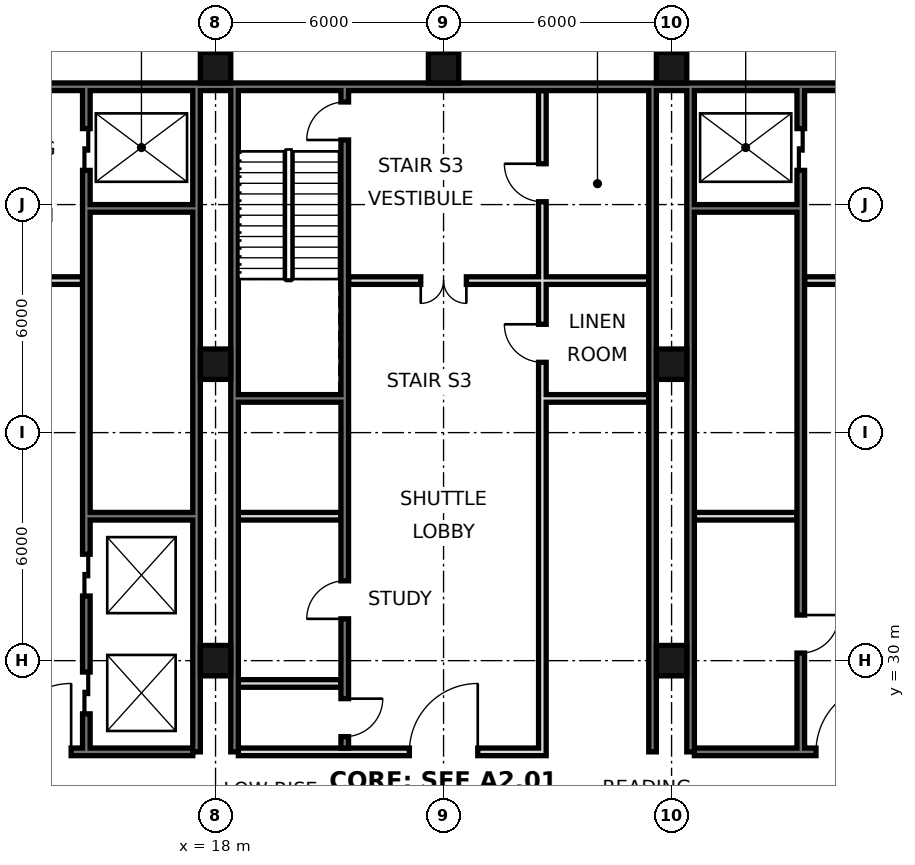
"""IFC4 building model, lengths in metres.
Left out: names, types, materials, properties, quantities, classifications, styles, units other than length and angle.
Written with IfcOpenShell. Run it as: python <this file> out.ifc"""

import sys

from ifc_helpers import new_model, si_unit, direction, frame, frame_2d, origin, origin_2d, place, context, subcontext, project, spatial, rectangle, hollow_rectangle, extrude, element, fill, save


model = new_model("IFC4")
c1 = context("Model", 3, precision=1e-05, world=origin(), true_north=direction((0.0, 1.0)))
c2 = subcontext(c1, "Body", "Model", "MODEL_VIEW")
j1 = project(units=[si_unit("LENGTHUNIT", "METRE"), si_unit("PLANEANGLEUNIT", "RADIAN")], contexts=[c1])
p1 = place(None, origin())
s1 = spatial("IfcSite", under=j1, at=p1, CompositionType="ELEMENT")
p2 = place(p1, origin())
s2 = spatial("IfcBuilding", under=s1, at=p2, CompositionType="ELEMENT")
p3 = place(p2, frame((0.0, 0.0, -13.5)))
s3 = spatial("IfcBuildingStorey", under=s2, at=p3, CompositionType="ELEMENT", Elevation=-13.5)
for number, where, z_axis, x_axis in (
    (1, (18.0, 30.0, 0.0), (0.0, 0.0, 1.0), (1.0, 0.0, 0.0)),
    (2, (18.0, 37.8, 0.0), (0.0, 0.0, 1.0), (1.0, 0.0, 0.0)),
    (3, (18.0, 45.6, 0.0), (0.0, 0.0, 1.0), (1.0, 0.0, 0.0)),
    (4, (24.0, 45.6, 0.0), (0.0, 0.0, 1.0), (1.0, 0.0, 0.0)),
    (5, (30.0, 30.0, 0.0), (0.0, 0.0, 1.0), (1.0, 0.0, 0.0)),
    (6, (30.0, 37.8, 0.0), (0.0, 0.0, 1.0), (1.0, 0.0, 0.0)),
    (7, (30.0, 45.6, 0.0), (0.0, 0.0, 1.0), (1.0, 0.0, 0.0)),
):
    element("IfcColumn", number, at=place(p3, frame(where, z_axis=z_axis, x_axis=x_axis)), inside=s3, PredefinedType="COLUMN", context=c2, shape_type="SweptSolid", body=[
        extrude(hollow_rectangle(XDim=0.8, YDim=0.8, WallThickness=0.07, at=origin_2d()), origin(), (0.0, 0.0, 1.0), 4.5),
    ])
p4 = place(p3, frame((6.6, 45.1, 0.0), z_axis=(0.0, 0.0, 1.0), x_axis=(1.0, 0.0, 0.0)))
e8 = element("IfcWall", 8, at=p4, inside=s3, PredefinedType="SOLIDWALL", context=c2, shape_type="SweptSolid", body=[
    extrude(rectangle(XDim=34.8, YDim=0.2, at=frame_2d((17.4, 0.0))), origin(), (0.0, 0.0, 1.0), 4.15),
])
for number, where, z_axis, x_axis in (
    (9, (17.5, 27.6, 0.0), (0.0, 0.0, 1.0), (0.0, 1.0, 0.0)),
    (10, (18.5, 27.6, 0.0), (0.0, 0.0, 1.0), (0.0, 1.0, 0.0)),
    (11, (29.5, 27.6, 0.0), (0.0, 0.0, 1.0), (0.0, 1.0, 0.0)),
    (12, (30.5, 27.6, 0.0), (0.0, 0.0, 1.0), (0.0, 1.0, 0.0)),
):
    element("IfcWall", number, at=place(p3, frame(where, z_axis=z_axis, x_axis=x_axis)), inside=s3, PredefinedType="SOLIDWALL", context=c2, shape_type="SweptSolid", body=[
        extrude(rectangle(XDim=17.5, YDim=0.2, at=frame_2d((8.75, 0.0))), origin(), (0.0, 0.0, 1.0), 4.15),
    ])
p5 = place(p3, frame((14.6, 27.7, 0.0), z_axis=(0.0, 0.0, 1.0), x_axis=(0.0, 1.0, 0.0)))
e13 = element("IfcWall", 13, at=p5, inside=s3, PredefinedType="SOLIDWALL", context=c2, shape_type="SweptSolid", body=[
    extrude(rectangle(XDim=17.3, YDim=0.2, at=frame_2d((8.65, 0.0))), origin(), (0.0, 0.0, 1.0), 4.15),
])
p6 = place(p5, frame((0.9, 0.0, 0.0)))
e14 = element("IfcOpeningElement", 14, at=p6, cuts=e13, PredefinedType="OPENING", context=c2, shape_type="SweptSolid", body=[
    extrude(rectangle(XDim=1.1, YDim=2.1, at=frame_2d((0.55, 1.05))), frame((0.0, 0.11, 0.0), z_axis=(0.0, -1.0, 0.0), x_axis=(1.0, 0.0, 0.0)), (0.0, 0.0, 1.0), 0.22),
])
p7 = place(p5, frame((4.0, 0.0, 0.0)))
e15 = element("IfcOpeningElement", 15, at=p7, cuts=e13, PredefinedType="OPENING", context=c2, shape_type="SweptSolid", body=[
    extrude(rectangle(XDim=1.1, YDim=2.1, at=frame_2d((0.55, 1.05))), frame((0.0, 0.11, 0.0), z_axis=(0.0, -1.0, 0.0), x_axis=(1.0, 0.0, 0.0)), (0.0, 0.0, 1.0), 0.22),
])
p8 = place(p5, frame((15.2, 0.0, 0.0)))
e16 = element("IfcOpeningElement", 16, at=p8, cuts=e13, PredefinedType="OPENING", context=c2, shape_type="SweptSolid", body=[
    extrude(rectangle(XDim=1.1, YDim=2.1, at=frame_2d((0.55, 1.05))), frame((0.0, 0.11, 0.0), z_axis=(0.0, -1.0, 0.0), x_axis=(1.0, 0.0, 0.0)), (0.0, 0.0, 1.0), 0.22),
])
p9 = place(p3, frame((21.4, 27.7, 0.0), z_axis=(0.0, 0.0, 1.0), x_axis=(0.0, 1.0, 0.0)))
e17 = element("IfcWall", 17, at=p9, inside=s3, PredefinedType="SOLIDWALL", context=c2, shape_type="SweptSolid", body=[
    extrude(rectangle(XDim=17.3, YDim=0.2, at=frame_2d((8.65, 0.0))), origin(), (0.0, 0.0, 1.0), 4.15),
])
p10 = place(p9, frame((0.3, 0.0, 0.0)))
e18 = element("IfcOpeningElement", 18, at=p10, cuts=e17, PredefinedType="OPENING", context=c2, shape_type="SweptSolid", body=[
    extrude(rectangle(XDim=1.0, YDim=2.1, at=frame_2d((0.5, 1.05))), frame((0.0, 0.11, 0.0), z_axis=(0.0, -1.0, 0.0), x_axis=(1.0, 0.0, 0.0)), (0.0, 0.0, 1.0), 0.22),
])
p11 = place(p9, frame((3.4, 0.0, 0.0)))
e19 = element("IfcOpeningElement", 19, at=p11, cuts=e17, PredefinedType="OPENING", context=c2, shape_type="SweptSolid", body=[
    extrude(rectangle(XDim=1.0, YDim=2.1, at=frame_2d((0.5, 1.05))), frame((0.0, 0.11, 0.0), z_axis=(0.0, -1.0, 0.0), x_axis=(1.0, 0.0, 0.0)), (0.0, 0.0, 1.0), 0.22),
])
p12 = place(p9, frame((16.0, 0.0, 0.0)))
e20 = element("IfcOpeningElement", 20, at=p12, cuts=e17, PredefinedType="OPENING", context=c2, shape_type="SweptSolid", body=[
    extrude(rectangle(XDim=1.0, YDim=2.1, at=frame_2d((0.5, 1.05))), frame((0.0, 0.11, 0.0), z_axis=(0.0, -1.0, 0.0), x_axis=(1.0, 0.0, 0.0)), (0.0, 0.0, 1.0), 0.22),
])
p13 = place(p3, frame((26.6, 27.5, 0.0), z_axis=(0.0, 0.0, 1.0), x_axis=(0.0, 1.0, 0.0)))
e21 = element("IfcWall", 21, at=p13, inside=s3, PredefinedType="PARTITIONING", context=c2, shape_type="SweptSolid", body=[
    extrude(rectangle(XDim=17.5, YDim=0.2, at=frame_2d((8.75, 0.0))), origin(), (0.0, 0.0, 1.0), 4.15),
])
p14 = place(p13, frame((10.35, 0.0, 0.0)))
e22 = element("IfcOpeningElement", 22, at=p14, cuts=e21, PredefinedType="OPENING", context=c2, shape_type="SweptSolid", body=[
    extrude(rectangle(XDim=1.0, YDim=2.1, at=frame_2d((0.5, 1.05))), frame((0.0, 0.11, 0.0), z_axis=(0.0, -1.0, 0.0), x_axis=(1.0, 0.0, 0.0)), (0.0, 0.0, 1.0), 0.22),
])
p15 = place(p13, frame((14.575, 0.0, 0.0)))
e23 = element("IfcOpeningElement", 23, at=p15, cuts=e21, PredefinedType="OPENING", context=c2, shape_type="SweptSolid", body=[
    extrude(rectangle(XDim=1.0, YDim=2.1, at=frame_2d((0.5, 1.05))), frame((0.0, 0.11, 0.0), z_axis=(0.0, -1.0, 0.0), x_axis=(1.0, 0.0, 0.0)), (0.0, 0.0, 1.0), 0.22),
])
p16 = place(p3, frame((33.4, 27.7, 0.0), z_axis=(0.0, 0.0, 1.0), x_axis=(0.0, 1.0, 0.0)))
e24 = element("IfcWall", 24, at=p16, inside=s3, PredefinedType="SOLIDWALL", context=c2, shape_type="SweptSolid", body=[
    extrude(rectangle(XDim=17.3, YDim=0.2, at=frame_2d((8.65, 0.0))), origin(), (0.0, 0.0, 1.0), 3.05),
])
p17 = place(p16, frame((15.2, 0.0, 0.0)))
e25 = element("IfcOpeningElement", 25, at=p17, cuts=e24, PredefinedType="OPENING", context=c2, shape_type="SweptSolid", body=[
    extrude(rectangle(XDim=1.1, YDim=2.1, at=frame_2d((0.55, 1.05))), frame((0.0, 0.11, 0.0), z_axis=(0.0, -1.0, 0.0), x_axis=(1.0, 0.0, 0.0)), (0.0, 0.0, 1.0), 0.22),
])
p18 = place(p16, frame((2.5, 0.0, 0.0)))
e26 = element("IfcOpeningElement", 26, at=p18, cuts=e24, PredefinedType="OPENING", context=c2, shape_type="SweptSolid", body=[
    extrude(rectangle(XDim=1.0, YDim=2.1, at=frame_2d((0.5, 1.05))), frame((0.0, 0.11, 0.0), z_axis=(0.0, -1.0, 0.0), x_axis=(1.0, 0.0, 0.0)), (0.0, 0.0, 1.0), 0.22),
])
p19 = place(p3, frame((18.6, 27.6, 0.0), z_axis=(0.0, 0.0, 1.0), x_axis=(1.0, 0.0, 0.0)))
e27 = element("IfcWall", 27, at=p19, inside=s3, PredefinedType="PARTITIONING", context=c2, shape_type="SweptSolid", body=[
    extrude(rectangle(XDim=7.9, YDim=0.2, at=frame_2d((3.95, 0.0))), origin(), (0.0, 0.0, 1.0), 4.15),
])
p20 = place(p19, frame((4.5, 0.0, 0.0)))
e28 = element("IfcOpeningElement", 28, at=p20, cuts=e27, PredefinedType="OPENING", context=c2, shape_type="SweptSolid", body=[
    extrude(rectangle(XDim=1.8, YDim=2.1, at=frame_2d((0.9, 1.05))), frame((0.0, 0.11, 0.0), z_axis=(0.0, -1.0, 0.0), x_axis=(1.0, 0.0, 0.0)), (0.0, 0.0, 1.0), 0.22),
])
p21 = place(p3, frame((30.6, 27.6, 0.0), z_axis=(0.0, 0.0, 1.0), x_axis=(1.0, 0.0, 0.0)))
e29 = element("IfcWall", 29, at=p21, inside=s3, PredefinedType="SOLIDWALL", context=c2, shape_type="SweptSolid", body=[
    extrude(rectangle(XDim=10.8, YDim=0.2, at=frame_2d((5.4, 0.0))), origin(), (0.0, 0.0, 1.0), 4.15),
])
p22 = place(p21, frame((3.2, 0.0, 0.0)))
e30 = element("IfcOpeningElement", 30, at=p22, cuts=e29, PredefinedType="OPENING", context=c2, shape_type="SweptSolid", body=[
    extrude(rectangle(XDim=1.8, YDim=2.1, at=frame_2d((0.9, 1.05))), frame((0.0, 0.11, 0.0), z_axis=(0.0, -1.0, 0.0), x_axis=(1.0, 0.0, 0.0)), (0.0, 0.0, 1.0), 0.22),
])
p23 = place(p3, frame((6.6, 27.6, 0.0), z_axis=(0.0, 0.0, 1.0), x_axis=(1.0, 0.0, 0.0)))
e31 = element("IfcWall", 31, at=p23, inside=s3, PredefinedType="SOLIDWALL", context=c2, shape_type="SweptSolid", body=[
    extrude(rectangle(XDim=10.8, YDim=0.2, at=frame_2d((5.4, 0.0))), origin(), (0.0, 0.0, 1.0), 4.15),
])
p24 = place(p23, frame((5.8, 0.0, 0.0)))
e32 = element("IfcOpeningElement", 32, at=p24, cuts=e31, PredefinedType="OPENING", context=c2, shape_type="SweptSolid", body=[
    extrude(rectangle(XDim=1.8, YDim=2.1, at=frame_2d((0.9, 1.05))), frame((0.0, 0.11, 0.0), z_axis=(0.0, -1.0, 0.0), x_axis=(1.0, 0.0, 0.0)), (0.0, 0.0, 1.0), 0.22),
])
p25 = place(p3, frame((18.6, 29.4, 0.0), z_axis=(0.0, 0.0, 1.0), x_axis=(1.0, 0.0, 0.0)))
e33 = element("IfcWall", 33, at=p25, inside=s3, PredefinedType="PARTITIONING", context=c2, shape_type="SweptSolid", body=[
    extrude(rectangle(XDim=2.7, YDim=0.2, at=frame_2d((1.35, 0.0))), origin(), (0.0, 0.0, 1.0), 4.15),
])
p26 = place(p3, frame((14.7, 33.8, 0.0), z_axis=(0.0, 0.0, 1.0), x_axis=(1.0, 0.0, 0.0)))
e34 = element("IfcWall", 34, at=p26, inside=s3, PredefinedType="SOLIDWALL", context=c2, shape_type="SweptSolid", body=[
    extrude(rectangle(XDim=2.7, YDim=0.2, at=frame_2d((1.35, 0.0))), origin(), (0.0, 0.0, 1.0), 4.15),
])
for number, where, z_axis, x_axis in (
    (35, (18.6, 33.8, 0.0), (0.0, 0.0, 1.0), (1.0, 0.0, 0.0)),
    (36, (30.6, 33.8, 0.0), (0.0, 0.0, 1.0), (1.0, 0.0, 0.0)),
):
    element("IfcWall", number, at=place(p3, frame(where, z_axis=z_axis, x_axis=x_axis)), inside=s3, PredefinedType="PARTITIONING", context=c2, shape_type="SweptSolid", body=[
        extrude(rectangle(XDim=2.7, YDim=0.2, at=frame_2d((1.35, 0.0))), origin(), (0.0, 0.0, 1.0), 4.15),
    ])
p27 = place(p3, frame((18.6, 36.9, 0.0), z_axis=(0.0, 0.0, 1.0), x_axis=(1.0, 0.0, 0.0)))
e37 = element("IfcWall", 37, at=p27, inside=s3, PredefinedType="SOLIDWALL", context=c2, shape_type="SweptSolid", body=[
    extrude(rectangle(XDim=2.7, YDim=0.2, at=frame_2d((1.35, 0.0))), origin(), (0.0, 0.0, 1.0), 4.15),
])
p28 = place(p3, frame((26.7, 36.9, 0.0), z_axis=(0.0, 0.0, 1.0), x_axis=(1.0, 0.0, 0.0)))
e38 = element("IfcWall", 38, at=p28, inside=s3, PredefinedType="PARTITIONING", context=c2, shape_type="SweptSolid", body=[
    extrude(rectangle(XDim=2.7, YDim=0.2, at=frame_2d((1.35, 0.0))), origin(), (0.0, 0.0, 1.0), 4.15),
])
p29 = place(p3, frame((21.5, 40.0, 0.0), z_axis=(0.0, 0.0, 1.0), x_axis=(1.0, 0.0, 0.0)))
e39 = element("IfcWall", 39, at=p29, inside=s3, PredefinedType="PARTITIONING", context=c2, shape_type="SweptSolid", body=[
    extrude(rectangle(XDim=7.9, YDim=0.2, at=frame_2d((3.95, 0.0))), origin(), (0.0, 0.0, 1.0), 4.15),
])
p30 = place(p29, frame((1.9, 0.0, 0.0)))
e40 = element("IfcOpeningElement", 40, at=p30, cuts=e39, PredefinedType="OPENING", context=c2, shape_type="SweptSolid", body=[
    extrude(rectangle(XDim=1.2, YDim=2.1, at=frame_2d((0.6, 1.05))), frame((0.0, 0.11, 0.0), z_axis=(0.0, -1.0, 0.0), x_axis=(1.0, 0.0, 0.0)), (0.0, 0.0, 1.0), 0.22),
])
p31 = place(p3, frame((33.5, 40.0, 0.0), z_axis=(0.0, 0.0, 1.0), x_axis=(1.0, 0.0, 0.0)))
e41 = element("IfcWall", 41, at=p31, inside=s3, PredefinedType="PARTITIONING", context=c2, shape_type="SweptSolid", body=[
    extrude(rectangle(XDim=5.0, YDim=0.2, at=frame_2d((2.5, 0.0))), origin(), (0.0, 0.0, 1.0), 4.15),
])
p32 = place(p31, frame((1.9, 0.0, 0.0)))
e42 = element("IfcOpeningElement", 42, at=p32, cuts=e41, PredefinedType="OPENING", context=c2, shape_type="SweptSolid", body=[
    extrude(rectangle(XDim=1.2, YDim=2.1, at=frame_2d((0.6, 1.05))), frame((0.0, 0.11, 0.0), z_axis=(0.0, -1.0, 0.0), x_axis=(1.0, 0.0, 0.0)), (0.0, 0.0, 1.0), 0.22),
])
p33 = place(p3, frame((9.5, 40.0, 0.0), z_axis=(0.0, 0.0, 1.0), x_axis=(1.0, 0.0, 0.0)))
e43 = element("IfcWall", 43, at=p33, inside=s3, PredefinedType="PARTITIONING", context=c2, shape_type="SweptSolid", body=[
    extrude(rectangle(XDim=5.0, YDim=0.2, at=frame_2d((2.5, 0.0))), origin(), (0.0, 0.0, 1.0), 4.15),
])
p34 = place(p33, frame((1.9, 0.0, 0.0)))
e44 = element("IfcOpeningElement", 44, at=p34, cuts=e43, PredefinedType="OPENING", context=c2, shape_type="SweptSolid", body=[
    extrude(rectangle(XDim=1.2, YDim=2.1, at=frame_2d((0.6, 1.05))), frame((0.0, 0.11, 0.0), z_axis=(0.0, -1.0, 0.0), x_axis=(1.0, 0.0, 0.0)), (0.0, 0.0, 1.0), 0.22),
])
for number, where, z_axis, x_axis in (
    (45, (14.7, 41.9, 0.0), (0.0, 0.0, 1.0), (1.0, 0.0, 0.0)),
    (46, (30.6, 41.9, 0.0), (0.0, 0.0, 1.0), (1.0, 0.0, 0.0)),
):
    element("IfcWall", number, at=place(p3, frame(where, z_axis=z_axis, x_axis=x_axis)), inside=s3, PredefinedType="SOLIDWALL", context=c2, shape_type="SweptSolid", body=[
        extrude(rectangle(XDim=2.7, YDim=0.2, at=frame_2d((1.35, 0.0))), origin(), (0.0, 0.0, 1.0), 4.15),
    ])
p35 = place(p24, frame((1.8, 0.0, 0.0), z_axis=(0.0, 0.0, 1.0), x_axis=(-1.0, 0.0, 0.0)))
e47 = element("IfcDoor", 47, at=p35, inside=s3, OperationType="SINGLE_SWING_LEFT", PredefinedType="DOOR", context=c2, shape_type="SweptSolid", body=[
    extrude(rectangle(XDim=1.8, YDim=2.1, at=frame_2d((0.9, 1.05))), frame((0.0, 0.025, 0.0), z_axis=(0.0, -1.0, 0.0), x_axis=(1.0, 0.0, 0.0)), (0.0, 0.0, 1.0), 0.05),
])
fill(e32, e47)
p36 = place(p20, frame((1.8, 0.0, 0.0), z_axis=(0.0, 0.0, 1.0), x_axis=(-1.0, 0.0, 0.0)))
e48 = element("IfcDoor", 48, at=p36, inside=s3, OperationType="SINGLE_SWING_LEFT", PredefinedType="DOOR", context=c2, shape_type="SweptSolid", body=[
    extrude(rectangle(XDim=1.8, YDim=2.1, at=frame_2d((0.9, 1.05))), frame((0.0, 0.025, 0.0), z_axis=(0.0, -1.0, 0.0), x_axis=(1.0, 0.0, 0.0)), (0.0, 0.0, 1.0), 0.05),
])
fill(e28, e48)
p37 = place(p30, frame((1.2, 0.0, 0.0), z_axis=(0.0, 0.0, 1.0), x_axis=(-1.0, 0.0, 0.0)))
e49 = element("IfcDoor", 49, at=p37, inside=s3, OperationType="DOUBLE_DOOR_SINGLE_SWING", PredefinedType="DOOR", context=c2, shape_type="SweptSolid", body=[
    extrude(rectangle(XDim=1.2, YDim=2.1, at=frame_2d((0.6, 1.05))), frame((0.0, 0.025, 0.0), z_axis=(0.0, -1.0, 0.0), x_axis=(1.0, 0.0, 0.0)), (0.0, 0.0, 1.0), 0.05),
])
fill(e40, e49)
p38 = place(p22, frame((1.8, 0.0, 0.0), z_axis=(0.0, 0.0, 1.0), x_axis=(-1.0, 0.0, 0.0)))
e50 = element("IfcDoor", 50, at=p38, inside=s3, OperationType="SINGLE_SWING_LEFT", PredefinedType="DOOR", context=c2, shape_type="SweptSolid", body=[
    extrude(rectangle(XDim=1.8, YDim=2.1, at=frame_2d((0.9, 1.05))), frame((0.0, 0.025, 0.0), z_axis=(0.0, -1.0, 0.0), x_axis=(1.0, 0.0, 0.0)), (0.0, 0.0, 1.0), 0.05),
])
fill(e30, e50)
p39 = place(p17, origin())
e51 = element("IfcDoor", 51, at=p39, inside=s3, OperationType="DOUBLE_DOOR_SLIDING", PredefinedType="DOOR", context=c2, shape_type="SweptSolid", body=[
    extrude(rectangle(XDim=1.1, YDim=2.1, at=frame_2d((0.55, 1.05))), frame((0.0, 0.025, 0.0), z_axis=(0.0, -1.0, 0.0), x_axis=(1.0, 0.0, 0.0)), (0.0, 0.0, 1.0), 0.05),
])
fill(e25, e51)
p40 = place(p6, origin())
e52 = element("IfcDoor", 52, at=p40, inside=s3, OperationType="DOUBLE_DOOR_SLIDING", PredefinedType="DOOR", context=c2, shape_type="SweptSolid", body=[
    extrude(rectangle(XDim=1.1, YDim=2.1, at=frame_2d((0.55, 1.05))), frame((0.0, 0.025, 0.0), z_axis=(0.0, -1.0, 0.0), x_axis=(1.0, 0.0, 0.0)), (0.0, 0.0, 1.0), 0.05),
])
fill(e14, e52)
p41 = place(p7, origin())
e53 = element("IfcDoor", 53, at=p41, inside=s3, OperationType="DOUBLE_DOOR_SLIDING", PredefinedType="DOOR", context=c2, shape_type="SweptSolid", body=[
    extrude(rectangle(XDim=1.1, YDim=2.1, at=frame_2d((0.55, 1.05))), frame((0.0, 0.025, 0.0), z_axis=(0.0, -1.0, 0.0), x_axis=(1.0, 0.0, 0.0)), (0.0, 0.0, 1.0), 0.05),
])
fill(e15, e53)
p42 = place(p8, origin())
e54 = element("IfcDoor", 54, at=p42, inside=s3, OperationType="DOUBLE_DOOR_SLIDING", PredefinedType="DOOR", context=c2, shape_type="SweptSolid", body=[
    extrude(rectangle(XDim=1.1, YDim=2.1, at=frame_2d((0.55, 1.05))), frame((0.0, 0.025, 0.0), z_axis=(0.0, -1.0, 0.0), x_axis=(1.0, 0.0, 0.0)), (0.0, 0.0, 1.0), 0.05),
])
fill(e16, e54)
p43 = place(p10, origin())
e55 = element("IfcDoor", 55, at=p43, inside=s3, OperationType="SINGLE_SWING_RIGHT", PredefinedType="DOOR", context=c2, shape_type="SweptSolid", body=[
    extrude(rectangle(XDim=1.0, YDim=2.1, at=frame_2d((0.5, 1.05))), frame((0.0, 0.025, 0.0), z_axis=(0.0, -1.0, 0.0), x_axis=(1.0, 0.0, 0.0)), (0.0, 0.0, 1.0), 0.05),
])
fill(e18, e55)
p44 = place(p11, origin())
e56 = element("IfcDoor", 56, at=p44, inside=s3, OperationType="SINGLE_SWING_LEFT", PredefinedType="DOOR", context=c2, shape_type="SweptSolid", body=[
    extrude(rectangle(XDim=1.0, YDim=2.1, at=frame_2d((0.5, 1.05))), frame((0.0, 0.025, 0.0), z_axis=(0.0, -1.0, 0.0), x_axis=(1.0, 0.0, 0.0)), (0.0, 0.0, 1.0), 0.05),
])
fill(e19, e56)
p45 = place(p18, origin())
e57 = element("IfcDoor", 57, at=p45, inside=s3, OperationType="SINGLE_SWING_RIGHT", PredefinedType="DOOR", context=c2, shape_type="SweptSolid", body=[
    extrude(rectangle(XDim=1.0, YDim=2.1, at=frame_2d((0.5, 1.05))), frame((0.0, 0.025, 0.0), z_axis=(0.0, -1.0, 0.0), x_axis=(1.0, 0.0, 0.0)), (0.0, 0.0, 1.0), 0.05),
])
fill(e26, e57)
p46 = place(p12, origin())
e58 = element("IfcDoor", 58, at=p46, inside=s3, OperationType="SINGLE_SWING_LEFT", PredefinedType="DOOR", context=c2, shape_type="SweptSolid", body=[
    extrude(rectangle(XDim=1.0, YDim=2.1, at=frame_2d((0.5, 1.05))), frame((0.0, 0.025, 0.0), z_axis=(0.0, -1.0, 0.0), x_axis=(1.0, 0.0, 0.0)), (0.0, 0.0, 1.0), 0.05),
])
fill(e20, e58)
p47 = place(p14, frame((1.0, 0.0, 0.0), z_axis=(0.0, 0.0, 1.0), x_axis=(-1.0, 0.0, 0.0)))
e59 = element("IfcDoor", 59, at=p47, inside=s3, OperationType="SINGLE_SWING_LEFT", PredefinedType="DOOR", context=c2, shape_type="SweptSolid", body=[
    extrude(rectangle(XDim=1.0, YDim=2.1, at=frame_2d((0.5, 1.05))), frame((0.0, 0.025, 0.0), z_axis=(0.0, -1.0, 0.0), x_axis=(1.0, 0.0, 0.0)), (0.0, 0.0, 1.0), 0.05),
])
fill(e22, e59)
p48 = place(p15, frame((1.0, 0.0, 0.0), z_axis=(0.0, 0.0, 1.0), x_axis=(-1.0, 0.0, 0.0)))
e60 = element("IfcDoor", 60, at=p48, inside=s3, OperationType="SINGLE_SWING_LEFT", PredefinedType="DOOR", context=c2, shape_type="SweptSolid", body=[
    extrude(rectangle(XDim=1.0, YDim=2.1, at=frame_2d((0.5, 1.05))), frame((0.0, 0.025, 0.0), z_axis=(0.0, -1.0, 0.0), x_axis=(1.0, 0.0, 0.0)), (0.0, 0.0, 1.0), 0.05),
])
fill(e23, e60)
save(model, sys.argv[1])
